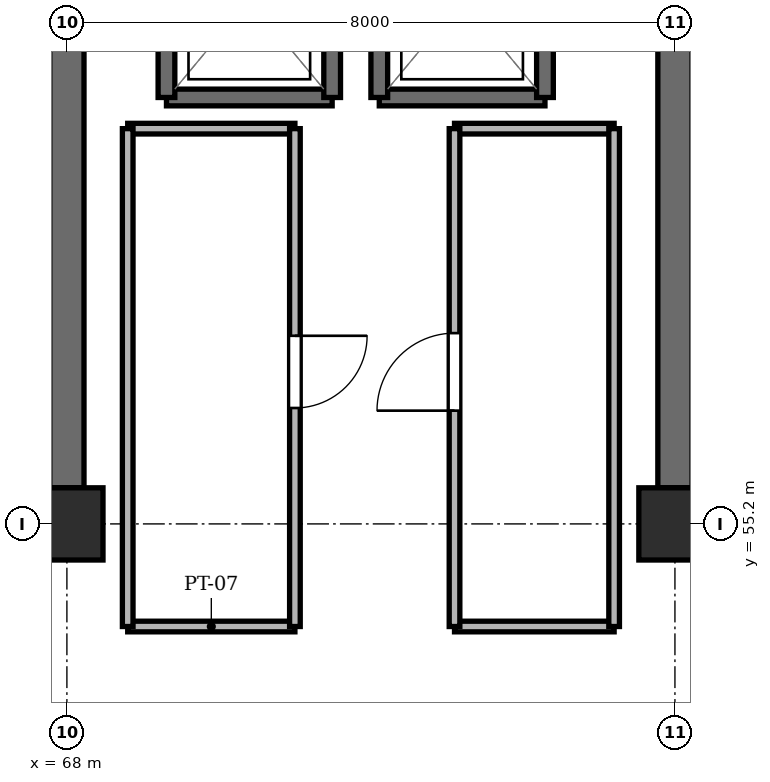
"""IFC4 building model, lengths in metres.
Left out: names, types, materials, properties, quantities, classifications, styles, units other than length and angle.
Written with IfcOpenShell. Run it as: python <this file> out.ifc"""

import sys

from ifc_helpers import new_model, si_unit, direction, frame, frame_2d, origin, origin_2d, place, context, subcontext, project, spatial, rectangle, extrude, element, fill, save


model = new_model("IFC4")
c1 = context("Model", 3, precision=1e-05, world=origin(), true_north=direction((0.0, 1.0)))
c2 = subcontext(c1, "Body", "Model", "MODEL_VIEW")
j1 = project(units=[si_unit("LENGTHUNIT", "METRE"), si_unit("PLANEANGLEUNIT", "RADIAN")], contexts=[c1])
p1 = place(None, origin())
s1 = spatial("IfcSite", under=j1, at=p1, CompositionType="ELEMENT")
p2 = place(p1, origin())
s2 = spatial("IfcBuilding", under=s1, at=p2, CompositionType="ELEMENT")
p3 = place(p2, frame((0.0, 0.0, 37.3)))
s3 = spatial("IfcBuildingStorey", under=s2, at=p3, CompositionType="ELEMENT", Elevation=37.3)
for number, where, z_axis, x_axis in (
    (1, (68.0, 55.2, -0.25), (0.0, 0.0, 1.0), (1.0, 0.0, 0.0)),
    (2, (76.0, 55.2, -0.25), (0.0, 0.0, 1.0), (1.0, 0.0, 0.0)),
):
    element("IfcColumn", number, at=place(p3, frame(where, z_axis=z_axis, x_axis=x_axis)), inside=s3, PredefinedType="COLUMN", context=c2, shape_type="SweptSolid", body=[
        extrude(rectangle(XDim=0.95, YDim=0.95, at=origin_2d()), origin(), (0.0, 0.0, 1.0), 3.26),
    ])
for number, where, z_axis, x_axis in (
    (3, (68.0, 55.675, 0.0), (0.0, 0.0, 1.0), (0.0, 1.0, 0.0)),
    (4, (76.0, 55.675, 0.0), (0.0, 0.0, 1.0), (0.0, 1.0, 0.0)),
):
    element("IfcWall", number, at=place(p3, frame(where, z_axis=z_axis, x_axis=x_axis)), inside=s3, PredefinedType="SHEAR", context=c2, shape_type="SweptSolid", body=[
        extrude(rectangle(XDim=6.325, YDim=0.45, at=frame_2d((3.163, 0.0))), origin(), (0.0, 0.0, 1.0), 3.01),
    ])
p4 = place(p3, frame((69.31, 60.81, 0.0), z_axis=(0.0, 0.0, 1.0), x_axis=(1.0, 0.0, 0.0)))
e5 = element("IfcWall", 5, at=p4, inside=s3, PredefinedType="SHEAR", context=c2, shape_type="SweptSolid", body=[
    extrude(rectangle(XDim=2.18, YDim=0.22, at=frame_2d((1.09, 0.0))), origin(), (0.0, 0.0, 1.0), 3.01),
])
for number, where, z_axis, x_axis in (
    (6, (69.31, 63.39, 0.0), (0.0, 0.0, 1.0), (0.0, -1.0, 0.0)),
    (7, (71.49, 60.81, 0.0), (0.0, 0.0, 1.0), (0.0, 1.0, 0.0)),
):
    element("IfcWall", number, at=place(p3, frame(where, z_axis=z_axis, x_axis=x_axis)), inside=s3, PredefinedType="SHEAR", context=c2, shape_type="SweptSolid", body=[
        extrude(rectangle(XDim=2.58, YDim=0.22, at=frame_2d((1.29, 0.0))), origin(), (0.0, 0.0, 1.0), 3.01),
    ])
p5 = place(p3, frame((72.11, 60.81, 0.0), z_axis=(0.0, 0.0, 1.0), x_axis=(1.0, 0.0, 0.0)))
e8 = element("IfcWall", 8, at=p5, inside=s3, PredefinedType="SHEAR", context=c2, shape_type="SweptSolid", body=[
    extrude(rectangle(XDim=2.18, YDim=0.22, at=frame_2d((1.09, 0.0))), origin(), (0.0, 0.0, 1.0), 3.01),
])
for number, where, z_axis, x_axis in (
    (9, (72.11, 63.39, 0.0), (0.0, 0.0, 1.0), (0.0, -1.0, 0.0)),
    (10, (74.29, 60.81, 0.0), (0.0, 0.0, 1.0), (0.0, 1.0, 0.0)),
):
    element("IfcWall", number, at=place(p3, frame(where, z_axis=z_axis, x_axis=x_axis)), inside=s3, PredefinedType="SHEAR", context=c2, shape_type="SweptSolid", body=[
        extrude(rectangle(XDim=2.58, YDim=0.22, at=frame_2d((1.29, 0.0))), origin(), (0.0, 0.0, 1.0), 3.01),
    ])
for number, where, z_axis, x_axis in (
    (11, (68.8, 53.85, 0.0), (0.0, 0.0, 1.0), (1.0, 0.0, 0.0)),
    (12, (68.8, 60.4, 0.0), (0.0, 0.0, 1.0), (1.0, 0.0, 0.0)),
):
    element("IfcWall", number, at=place(p3, frame(where, z_axis=z_axis, x_axis=x_axis)), inside=s3, PredefinedType="PARTITIONING", context=c2, shape_type="SweptSolid", body=[
        extrude(rectangle(XDim=2.2, YDim=0.14, at=frame_2d((1.1, 0.0))), origin(), (0.0, 0.0, 1.0), 2.53),
    ])
p6 = place(p3, frame((68.8, 53.85, 0.0), z_axis=(0.0, 0.0, 1.0), x_axis=(0.0, 1.0, 0.0)))
e13 = element("IfcWall", 13, at=p6, inside=s3, PredefinedType="PARTITIONING", context=c2, shape_type="SweptSolid", body=[
    extrude(rectangle(XDim=6.55, YDim=0.14, at=frame_2d((3.275, 0.0))), origin(), (0.0, 0.0, 1.0), 2.53),
])
p7 = place(p3, frame((71.0, 53.85, 0.0), z_axis=(0.0, 0.0, 1.0), x_axis=(0.0, 1.0, 0.0)))
e14 = element("IfcWall", 14, at=p7, inside=s3, PredefinedType="PARTITIONING", context=c2, shape_type="SweptSolid", body=[
    extrude(rectangle(XDim=6.55, YDim=0.14, at=frame_2d((3.275, 0.0))), origin(), (0.0, 0.0, 1.0), 2.53),
])
p8 = place(p7, frame((2.875, 0.0, 0.0)))
e15 = element("IfcOpeningElement", 15, at=p8, cuts=e14, PredefinedType="OPENING", context=c2, shape_type="SweptSolid", body=[
    extrude(rectangle(XDim=0.95, YDim=2.1, at=frame_2d((0.475, 1.05))), frame((0.0, 0.082, 0.0), z_axis=(0.0, -1.0, 0.0), x_axis=(1.0, 0.0, 0.0)), (0.0, 0.0, 1.0), 0.164),
])
for number, where, z_axis, x_axis in (
    (16, (73.1, 53.85, 0.0), (0.0, 0.0, 1.0), (1.0, 0.0, 0.0)),
    (17, (73.1, 60.4, 0.0), (0.0, 0.0, 1.0), (1.0, 0.0, 0.0)),
):
    element("IfcWall", number, at=place(p3, frame(where, z_axis=z_axis, x_axis=x_axis)), inside=s3, PredefinedType="PARTITIONING", context=c2, shape_type="SweptSolid", body=[
        extrude(rectangle(XDim=2.1, YDim=0.14, at=frame_2d((1.05, 0.0))), origin(), (0.0, 0.0, 1.0), 2.53),
    ])
p9 = place(p3, frame((73.1, 53.85, 0.0), z_axis=(0.0, 0.0, 1.0), x_axis=(0.0, 1.0, 0.0)))
e18 = element("IfcWall", 18, at=p9, inside=s3, PredefinedType="PARTITIONING", context=c2, shape_type="SweptSolid", body=[
    extrude(rectangle(XDim=6.55, YDim=0.14, at=frame_2d((3.275, 0.0))), origin(), (0.0, 0.0, 1.0), 2.53),
])
p10 = place(p9, frame((2.84, 0.0, 0.0)))
e19 = element("IfcOpeningElement", 19, at=p10, cuts=e18, PredefinedType="OPENING", context=c2, shape_type="SweptSolid", body=[
    extrude(rectangle(XDim=1.02, YDim=2.1, at=frame_2d((0.51, 1.05))), frame((0.0, 0.082, 0.0), z_axis=(0.0, -1.0, 0.0), x_axis=(1.0, 0.0, 0.0)), (0.0, 0.0, 1.0), 0.164),
])
p11 = place(p3, frame((75.2, 53.85, 0.0), z_axis=(0.0, 0.0, 1.0), x_axis=(0.0, 1.0, 0.0)))
e20 = element("IfcWall", 20, at=p11, inside=s3, PredefinedType="PARTITIONING", context=c2, shape_type="SweptSolid", body=[
    extrude(rectangle(XDim=6.55, YDim=0.14, at=frame_2d((3.275, 0.0))), origin(), (0.0, 0.0, 1.0), 2.53),
])
p12 = place(p8, frame((0.95, 0.0, 0.0), z_axis=(0.0, 0.0, 1.0), x_axis=(-1.0, 0.0, 0.0)))
e21 = element("IfcDoor", 21, at=p12, inside=s3, OperationType="SINGLE_SWING_RIGHT", PredefinedType="DOOR", context=c2, shape_type="SweptSolid", body=[
    extrude(rectangle(XDim=0.95, YDim=2.1, at=frame_2d((0.475, 1.05))), frame((0.0, 0.025, 0.0), z_axis=(0.0, -1.0, 0.0), x_axis=(1.0, 0.0, 0.0)), (0.0, 0.0, 1.0), 0.05),
])
fill(e15, e21)
p13 = place(p10, origin())
e22 = element("IfcDoor", 22, at=p13, inside=s3, OperationType="SINGLE_SWING_LEFT", PredefinedType="DOOR", context=c2, shape_type="SweptSolid", body=[
    extrude(rectangle(XDim=1.02, YDim=2.1, at=frame_2d((0.51, 1.05))), frame((0.0, 0.025, 0.0), z_axis=(0.0, -1.0, 0.0), x_axis=(1.0, 0.0, 0.0)), (0.0, 0.0, 1.0), 0.05),
])
fill(e19, e22)
save(model, sys.argv[1])
